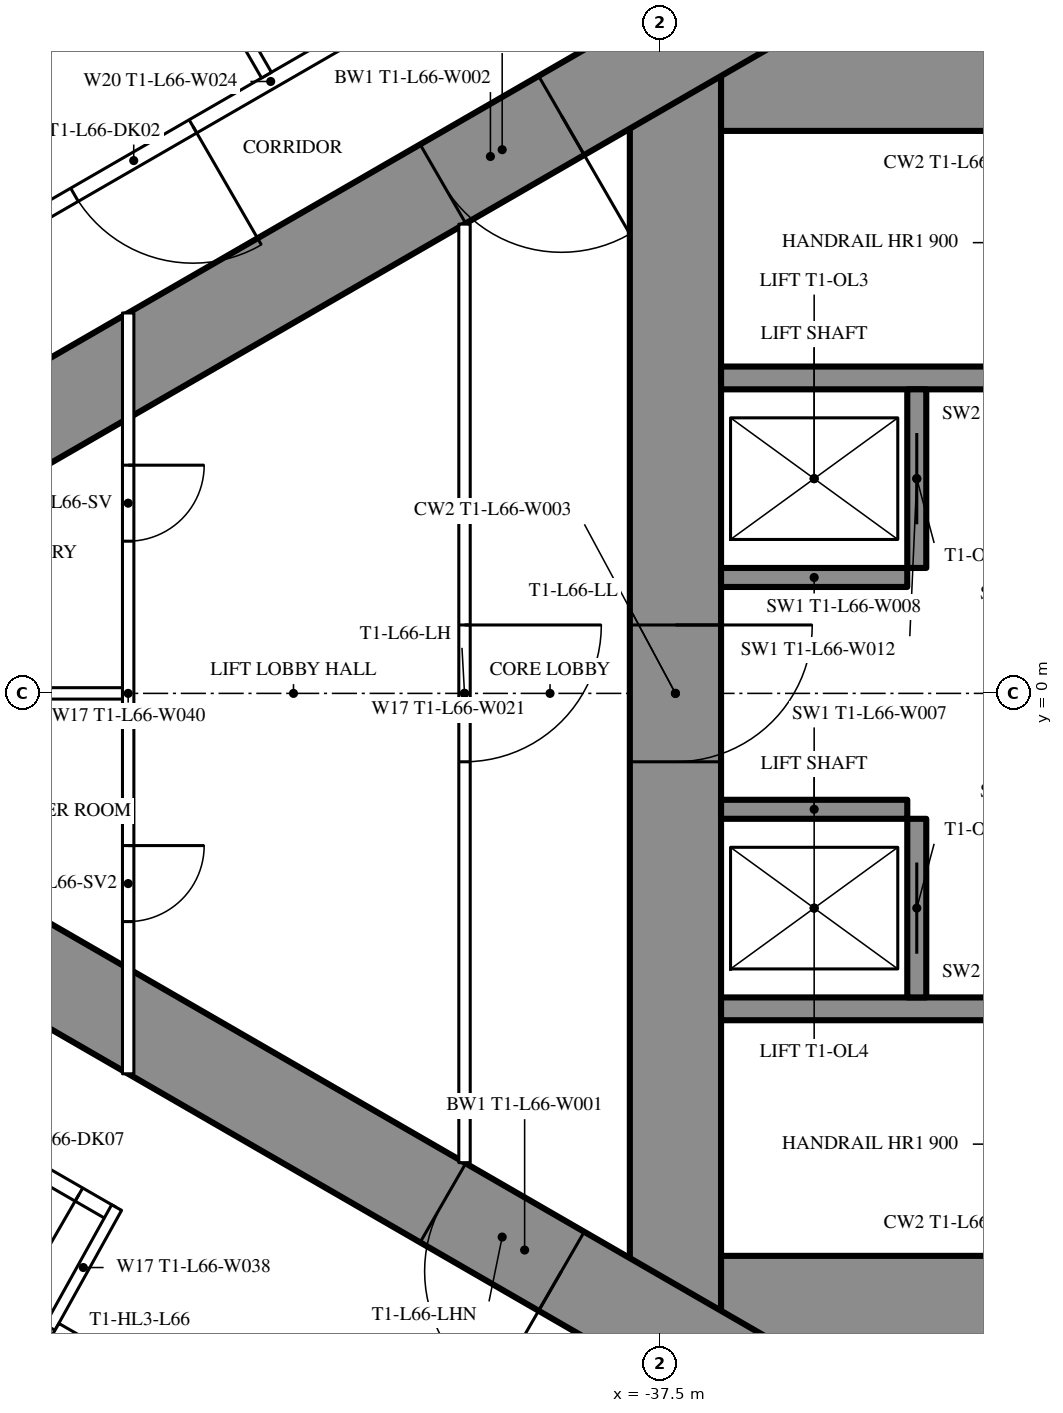
"""IFC4 building model, lengths in metres.
Left out: names, types, materials, properties, quantities, classifications, styles, units other than length and angle.
Written with IfcOpenShell. Run it as: python <this file> out.ifc"""

import sys

from ifc_helpers import new_model, si_unit, direction, frame, frame_2d, origin, place, context, subcontext, project, spatial, rectangle, extrude, element, fill, save


model = new_model("IFC4")
c1 = context("Model", 3, precision=1e-05, world=origin(), true_north=direction((0.0, 1.0)))
c2 = subcontext(c1, "Body", "Model", "MODEL_VIEW")
j1 = project(units=[si_unit("LENGTHUNIT", "METRE"), si_unit("PLANEANGLEUNIT", "RADIAN")], contexts=[c1])
p1 = place(None, origin())
s1 = spatial("IfcSite", under=j1, at=p1, CompositionType="ELEMENT")
p2 = place(p1, origin())
s2 = spatial("IfcBuilding", under=s1, at=p2, CompositionType="ELEMENT")
p3 = place(p2, frame((0.0, 0.0, 247.7)))
s3 = spatial("IfcBuildingStorey", under=s2, at=p3, CompositionType="ELEMENT", Elevation=247.7)
p4 = place(p3, frame((-37.3, 8.6, 0.0), z_axis=(0.0, 0.0, 1.0), x_axis=(0.0, -1.0, 0.0)))
e1 = element("IfcWall", 1, at=p4, inside=s3, PredefinedType="SHEAR", context=c2, shape_type="SweptSolid", body=[
    extrude(rectangle(XDim=17.2, YDim=1.2, at=frame_2d((8.6, 0.0))), origin(), (0.0, 0.0, 1.0), 4.2),
])
p5 = place(p4, frame((7.7, 0.0, 0.0)))
e2 = element("IfcOpeningElement", 2, at=p5, cuts=e1, PredefinedType="OPENING", context=c2, shape_type="SweptSolid", body=[
    extrude(rectangle(XDim=1.8, YDim=2.2, at=frame_2d((0.9, 1.1))), frame((0.0, 0.61, 0.0), z_axis=(0.0, -1.0, 0.0), x_axis=(1.0, 0.0, 0.0)), (0.0, 0.0, 1.0), 1.22),
])
p6 = place(p3, frame((-28.3, 8.0, 0.0), z_axis=(0.0, 0.0, 1.0), x_axis=(-1.0, 0.0, 0.0)))
e3 = element("IfcWall", 3, at=p6, inside=s3, PredefinedType="SHEAR", context=c2, shape_type="SweptSolid", body=[
    extrude(rectangle(XDim=8.4, YDim=1.2, at=frame_2d((4.2, 0.0))), origin(), (0.0, 0.0, 1.0), 4.2),
])
p7 = place(p6, frame((0.25, 0.0, 0.0)))
e4 = element("IfcOpeningElement", 4, at=p7, cuts=e3, PredefinedType="OPENING", context=c2, shape_type="SweptSolid", body=[
    extrude(rectangle(XDim=1.0, YDim=2.2, at=frame_2d((0.5, 1.1))), frame((0.0, 0.61, 0.0), z_axis=(0.0, -1.0, 0.0), x_axis=(1.0, 0.0, 0.0)), (0.0, 0.0, 1.0), 1.22),
])
p8 = place(p3, frame((-28.3, -8.0, 0.0), z_axis=(0.0, 0.0, 1.0), x_axis=(-1.0, 0.0, 0.0)))
e5 = element("IfcWall", 5, at=p8, inside=s3, PredefinedType="SHEAR", context=c2, shape_type="SweptSolid", body=[
    extrude(rectangle(XDim=8.4, YDim=1.2, at=frame_2d((4.2, 0.0))), origin(), (0.0, 0.0, 1.0), 4.2),
])
p9 = place(p8, frame((0.25, 0.0, 0.0)))
e6 = element("IfcOpeningElement", 6, at=p9, cuts=e5, PredefinedType="OPENING", context=c2, shape_type="SweptSolid", body=[
    extrude(rectangle(XDim=1.0, YDim=2.2, at=frame_2d((0.5, 1.1))), frame((0.0, 0.61, 0.0), z_axis=(0.0, -1.0, 0.0), x_axis=(1.0, 0.0, 0.0)), (0.0, 0.0, 1.0), 1.22),
])
for number, where, z_axis, x_axis in (
    (7, (-28.3, 4.15, 0.0), (0.0, 0.0, 1.0), (-1.0, 0.0, 0.0)),
    (8, (-28.3, -4.15, 0.0), (0.0, 0.0, 1.0), (-1.0, 0.0, 0.0)),
):
    element("IfcWall", number, at=place(p3, frame(where, z_axis=z_axis, x_axis=x_axis)), inside=s3, PredefinedType="SHEAR", context=c2, shape_type="SweptSolid", body=[
        extrude(rectangle(XDim=8.4, YDim=0.3, at=frame_2d((4.2, 0.0))), origin(), (0.0, 0.0, 1.0), 4.2),
    ])
p10 = place(p3, frame((-34.125, 4.0, 0.0), z_axis=(0.0, 0.0, 1.0), x_axis=(0.0, -1.0, 0.0)))
e9 = element("IfcWall", 9, at=p10, inside=s3, PredefinedType="SHEAR", context=c2, shape_type="SweptSolid", body=[
    extrude(rectangle(XDim=2.35, YDim=0.25, at=frame_2d((1.175, 0.0))), origin(), (0.0, 0.0, 1.0), 4.2),
])
p11 = place(p10, frame((0.575, 0.0, 0.0)))
e10 = element("IfcOpeningElement", 10, at=p11, cuts=e9, PredefinedType="OPENING", context=c2, shape_type="SweptSolid", body=[
    extrude(rectangle(XDim=1.2, YDim=2.2, at=frame_2d((0.6, 1.1))), frame((0.0, 0.135, 0.0), z_axis=(0.0, -1.0, 0.0), x_axis=(1.0, 0.0, 0.0)), (0.0, 0.0, 1.0), 0.27),
])
p12 = place(p3, frame((-34.25, 1.525, 0.0), z_axis=(0.0, 0.0, 1.0), x_axis=(-1.0, 0.0, 0.0)))
e11 = element("IfcWall", 11, at=p12, inside=s3, PredefinedType="SHEAR", context=c2, shape_type="SweptSolid", body=[
    extrude(rectangle(XDim=2.45, YDim=0.25, at=frame_2d((1.225, 0.0))), origin(), (0.0, 0.0, 1.0), 4.2),
])
p13 = place(p3, frame((-34.125, -1.65, 0.0), z_axis=(0.0, 0.0, 1.0), x_axis=(0.0, -1.0, 0.0)))
e12 = element("IfcWall", 12, at=p13, inside=s3, PredefinedType="SHEAR", context=c2, shape_type="SweptSolid", body=[
    extrude(rectangle(XDim=2.35, YDim=0.25, at=frame_2d((1.175, 0.0))), origin(), (0.0, 0.0, 1.0), 4.2),
])
p14 = place(p13, frame((0.575, 0.0, 0.0)))
e13 = element("IfcOpeningElement", 13, at=p14, cuts=e12, PredefinedType="OPENING", context=c2, shape_type="SweptSolid", body=[
    extrude(rectangle(XDim=1.2, YDim=2.2, at=frame_2d((0.6, 1.1))), frame((0.0, 0.135, 0.0), z_axis=(0.0, -1.0, 0.0), x_axis=(1.0, 0.0, 0.0)), (0.0, 0.0, 1.0), 0.27),
])
p15 = place(p3, frame((-34.25, -1.525, 0.0), z_axis=(0.0, 0.0, 1.0), x_axis=(-1.0, 0.0, 0.0)))
e14 = element("IfcWall", 14, at=p15, inside=s3, PredefinedType="SHEAR", context=c2, shape_type="SweptSolid", body=[
    extrude(rectangle(XDim=2.45, YDim=0.25, at=frame_2d((1.225, 0.0))), origin(), (0.0, 0.0, 1.0), 4.2),
])
p16 = place(p3, frame((-27.2, 14.3, 0.0), z_axis=(0.0, 0.0, 1.0), x_axis=(-0.866026593062, -0.499997940104, 0.0)))
e15 = element("IfcWall", 15, at=p16, inside=s3, PredefinedType="SHEAR", context=c2, shape_type="SweptSolid", body=[
    extrude(rectangle(XDim=28.946, YDim=1.2, at=frame_2d((14.473, 0.0))), origin(), (0.0, 0.0, 1.0), 4.2),
])
p17 = place(p16, frame((4.6, 0.0, 0.0)))
e16 = element("IfcOpeningElement", 16, at=p17, cuts=e15, PredefinedType="OPENING", context=c2, shape_type="SweptSolid", body=[
    extrude(rectangle(XDim=1.0, YDim=2.2, at=frame_2d((0.5, 1.1))), frame((0.0, 0.61, 0.0), z_axis=(0.0, -1.0, 0.0), x_axis=(1.0, 0.0, 0.0)), (0.0, 0.0, 1.0), 1.22),
])
p18 = place(p16, frame((13.395, 0.0, 0.0)))
e17 = element("IfcOpeningElement", 17, at=p18, cuts=e15, PredefinedType="OPENING", context=c2, shape_type="SweptSolid", body=[
    extrude(rectangle(XDim=1.8, YDim=2.2, at=frame_2d((0.9, 1.1))), frame((0.0, 0.61, 0.0), z_axis=(0.0, -1.0, 0.0), x_axis=(1.0, 0.0, 0.0)), (0.0, 0.0, 1.0), 1.22),
])
p19 = place(p3, frame((-27.2, -14.3, 0.0), z_axis=(0.0, 0.0, 1.0), x_axis=(-0.866024021859, 0.500002393557, 0.0)))
e18 = element("IfcWall", 18, at=p19, inside=s3, PredefinedType="SHEAR", context=c2, shape_type="SweptSolid", body=[
    extrude(rectangle(XDim=27.907, YDim=1.2, at=frame_2d((13.954, 0.0))), origin(), (0.0, 0.0, 1.0), 4.2),
])
p20 = place(p19, frame((4.6, 0.0, 0.0)))
e19 = element("IfcOpeningElement", 19, at=p20, cuts=e18, PredefinedType="OPENING", context=c2, shape_type="SweptSolid", body=[
    extrude(rectangle(XDim=1.0, YDim=2.2, at=frame_2d((0.5, 1.1))), frame((0.0, 0.61, 0.0), z_axis=(0.0, -1.0, 0.0), x_axis=(1.0, 0.0, 0.0)), (0.0, 0.0, 1.0), 1.22),
])
p21 = place(p19, frame((13.395, 0.0, 0.0)))
e20 = element("IfcOpeningElement", 20, at=p21, cuts=e18, PredefinedType="OPENING", context=c2, shape_type="SweptSolid", body=[
    extrude(rectangle(XDim=1.8, YDim=2.2, at=frame_2d((0.9, 1.1))), frame((0.0, 0.61, 0.0), z_axis=(0.0, -1.0, 0.0), x_axis=(1.0, 0.0, 0.0)), (0.0, 0.0, 1.0), 1.22),
])
p22 = place(p3, frame((-28.681, 16.101, 0.0), z_axis=(0.0, 0.0, 1.0), x_axis=(-0.866024860443, -0.500000941094, 0.0)))
e21 = element("IfcWall", 21, at=p22, inside=s3, PredefinedType="PARTITIONING", context=c2, shape_type="SweptSolid", body=[
    extrude(rectangle(XDim=32.201, YDim=0.2, at=frame_2d((16.101, 0.0))), origin(), (0.0, 0.0, 1.0), 3.95),
])
p23 = place(p22, frame((7.266, 0.0, 0.0)))
e22 = element("IfcOpeningElement", 22, at=p23, cuts=e21, PredefinedType="OPENING", context=c2, shape_type="SweptSolid", body=[
    extrude(rectangle(XDim=1.8, YDim=2.2, at=frame_2d((0.9, 1.1))), frame((0.0, 0.11, 0.0), z_axis=(0.0, -1.0, 0.0), x_axis=(1.0, 0.0, 0.0)), (0.0, 0.0, 1.0), 0.22),
])
p24 = place(p22, frame((17.281, 0.0, 0.0)))
e23 = element("IfcOpeningElement", 23, at=p24, cuts=e21, PredefinedType="OPENING", context=c2, shape_type="SweptSolid", body=[
    extrude(rectangle(XDim=1.8, YDim=2.2, at=frame_2d((0.9, 1.1))), frame((0.0, 0.11, 0.0), z_axis=(0.0, -1.0, 0.0), x_axis=(1.0, 0.0, 0.0)), (0.0, 0.0, 1.0), 0.22),
])
p25 = place(p22, frame((21.43, 0.0, 0.0)))
e24 = element("IfcOpeningElement", 24, at=p25, cuts=e21, PredefinedType="OPENING", context=c2, shape_type="SweptSolid", body=[
    extrude(rectangle(XDim=1.8, YDim=2.2, at=frame_2d((0.9, 1.1))), frame((0.0, 0.11, 0.0), z_axis=(0.0, -1.0, 0.0), x_axis=(1.0, 0.0, 0.0)), (0.0, 0.0, 1.0), 0.22),
])
p26 = place(p22, frame((27.29, 0.0, 0.0)))
e25 = element("IfcOpeningElement", 25, at=p26, cuts=e21, PredefinedType="OPENING", context=c2, shape_type="SweptSolid", body=[
    extrude(rectangle(XDim=1.8, YDim=2.2, at=frame_2d((0.9, 1.1))), frame((0.0, 0.11, 0.0), z_axis=(0.0, -1.0, 0.0), x_axis=(1.0, 0.0, 0.0)), (0.0, 0.0, 1.0), 0.22),
])
p27 = place(p3, frame((-42.68, 8.134, 0.0), z_axis=(0.0, 0.0, 1.0), x_axis=(-0.499984479505, 0.866034364361, 0.0)))
e26 = element("IfcWall", 26, at=p27, inside=s3, PredefinedType="PARTITIONING", context=c2, shape_type="SweptSolid", body=[
    extrude(rectangle(XDim=5.995, YDim=0.15, at=frame_2d((2.998, 0.0))), origin(), (0.0, 0.0, 1.0), 3.05),
])
p28 = place(p3, frame((-44.715, -6.844, 0.0), z_axis=(0.0, 0.0, 1.0), x_axis=(-0.866025261224, 0.500000246922, 0.0)))
e27 = element("IfcWall", 27, at=p28, inside=s3, PredefinedType="PARTITIONING", context=c2, shape_type="SweptSolid", body=[
    extrude(rectangle(XDim=13.567, YDim=0.2, at=frame_2d((6.783, 0.0))), origin(), (0.0, 0.0, 1.0), 3.95),
])
p29 = place(p28, frame((8.716, 0.0, 0.0)))
e28 = element("IfcOpeningElement", 28, at=p29, cuts=e27, PredefinedType="OPENING", context=c2, shape_type="SweptSolid", body=[
    extrude(rectangle(XDim=1.8, YDim=2.2, at=frame_2d((0.9, 1.1))), frame((0.0, 0.11, 0.0), z_axis=(0.0, -1.0, 0.0), x_axis=(1.0, 0.0, 0.0)), (0.0, 0.0, 1.0), 0.22),
])
p30 = place(p28, frame((2.916, 0.0, 0.0)))
e29 = element("IfcOpeningElement", 29, at=p30, cuts=e27, PredefinedType="OPENING", context=c2, shape_type="SweptSolid", body=[
    extrude(rectangle(XDim=1.8, YDim=2.2, at=frame_2d((0.9, 1.1))), frame((0.0, 0.11, 0.0), z_axis=(0.0, -1.0, 0.0), x_axis=(1.0, 0.0, 0.0)), (0.0, 0.0, 1.0), 0.22),
])
p31 = place(p28, frame((0.5, 0.0, 0.0)))
e30 = element("IfcOpeningElement", 30, at=p31, cuts=e27, PredefinedType="OPENING", context=c2, shape_type="SweptSolid", body=[
    extrude(rectangle(XDim=0.967, YDim=2.2, at=frame_2d((0.483, 1.1))), frame((0.0, 0.11, 0.0), z_axis=(0.0, -1.0, 0.0), x_axis=(1.0, 0.0, 0.0)), (0.0, 0.0, 1.0), 0.22),
])
p32 = place(p3, frame((-44.652, -6.764, 0.0), z_axis=(0.0, 0.0, 1.0), x_axis=(-0.485528096672, -0.8742210632, 0.0)))
e31 = element("IfcWall", 31, at=p32, inside=s3, PredefinedType="PARTITIONING", context=c2, shape_type="SweptSolid", body=[
    extrude(rectangle(XDim=1.805, YDim=0.15, at=frame_2d((0.903, 0.0))), origin(), (0.0, 0.0, 1.0), 3.95),
])
p33 = place(p3, frame((-40.075, 6.174, 0.0), z_axis=(0.0, 0.0, 1.0), x_axis=(0.0, -1.0, 0.0)))
e32 = element("IfcWall", 32, at=p33, inside=s3, PredefinedType="PARTITIONING", context=c2, shape_type="SweptSolid", body=[
    extrude(rectangle(XDim=12.348, YDim=0.15, at=frame_2d((6.174, 0.0))), origin(), (0.0, 0.0, 1.0), 3.95),
])
p34 = place(p33, frame((5.274, 0.0, 0.0)))
e33 = element("IfcOpeningElement", 33, at=p34, cuts=e32, PredefinedType="OPENING", context=c2, shape_type="SweptSolid", body=[
    extrude(rectangle(XDim=1.8, YDim=2.2, at=frame_2d((0.9, 1.1))), frame((0.0, 0.085, 0.0), z_axis=(0.0, -1.0, 0.0), x_axis=(1.0, 0.0, 0.0)), (0.0, 0.0, 1.0), 0.17),
])
p35 = place(p3, frame((-44.5, 5.005, 0.0), z_axis=(0.0, 0.0, 1.0), x_axis=(0.0, -1.0, 0.0)))
e34 = element("IfcWall", 34, at=p35, inside=s3, PredefinedType="PARTITIONING", context=c2, shape_type="SweptSolid", body=[
    extrude(rectangle(XDim=10.009, YDim=0.15, at=frame_2d((5.005, 0.0))), origin(), (0.0, 0.0, 1.0), 3.1),
])
p36 = place(p35, frame((2.002, 0.0, 0.0)))
e35 = element("IfcOpeningElement", 35, at=p36, cuts=e34, PredefinedType="OPENING", context=c2, shape_type="SweptSolid", body=[
    extrude(rectangle(XDim=1.0, YDim=2.2, at=frame_2d((0.5, 1.1))), frame((0.0, 0.085, 0.0), z_axis=(0.0, -1.0, 0.0), x_axis=(1.0, 0.0, 0.0)), (0.0, 0.0, 1.0), 0.17),
])
p37 = place(p35, frame((7.007, 0.0, 0.0)))
e36 = element("IfcOpeningElement", 36, at=p37, cuts=e34, PredefinedType="OPENING", context=c2, shape_type="SweptSolid", body=[
    extrude(rectangle(XDim=1.0, YDim=2.2, at=frame_2d((0.5, 1.1))), frame((0.0, 0.085, 0.0), z_axis=(0.0, -1.0, 0.0), x_axis=(1.0, 0.0, 0.0)), (0.0, 0.0, 1.0), 0.17),
])
p38 = place(p3, frame((-44.575, 0.0, 0.0), z_axis=(0.0, 0.0, 1.0), x_axis=(-1.0, 0.0, 0.0)))
e37 = element("IfcWall", 37, at=p38, inside=s3, PredefinedType="PARTITIONING", context=c2, shape_type="SweptSolid", body=[
    extrude(rectangle(XDim=8.593, YDim=0.15, at=frame_2d((4.297, 0.0))), origin(), (0.0, 0.0, 1.0), 3.05),
])
p39 = place(p3, frame((-39.758, -11.697, 0.0), z_axis=(0.0, 0.0, 1.0), x_axis=(-0.866024194504, 0.500002094529, 0.0)))
e38 = element("IfcWall", 38, at=p39, inside=s3, PredefinedType="PARTITIONING", context=c2, shape_type="SweptSolid", body=[
    extrude(rectangle(XDim=6.6, YDim=0.25, at=frame_2d((3.3, 0.0))), origin(), (0.0, 0.0, 1.0), 3.95),
])
p40 = place(p39, frame((0.75, 0.0, 0.0)))
e39 = element("IfcOpeningElement", 39, at=p40, cuts=e38, PredefinedType="OPENING", context=c2, shape_type="SweptSolid", body=[
    extrude(rectangle(XDim=1.1, YDim=2.2, at=frame_2d((0.55, 1.1))), frame((0.0, 0.135, 0.0), z_axis=(0.0, -1.0, 0.0), x_axis=(1.0, 0.0, 0.0)), (0.0, 0.0, 1.0), 0.27),
])
p41 = place(p39, frame((2.75, 0.0, 0.0)))
e40 = element("IfcOpeningElement", 40, at=p41, cuts=e38, PredefinedType="OPENING", context=c2, shape_type="SweptSolid", body=[
    extrude(rectangle(XDim=1.1, YDim=2.2, at=frame_2d((0.55, 1.1))), frame((0.0, 0.135, 0.0), z_axis=(0.0, -1.0, 0.0), x_axis=(1.0, 0.0, 0.0)), (0.0, 0.0, 1.0), 0.27),
])
p42 = place(p39, frame((4.75, 0.0, 0.0)))
e41 = element("IfcOpeningElement", 41, at=p42, cuts=e38, PredefinedType="OPENING", context=c2, shape_type="SweptSolid", body=[
    extrude(rectangle(XDim=1.1, YDim=2.2, at=frame_2d((0.55, 1.1))), frame((0.0, 0.135, 0.0), z_axis=(0.0, -1.0, 0.0), x_axis=(1.0, 0.0, 0.0)), (0.0, 0.0, 1.0), 0.27),
])
p43 = place(p24, origin())
e42 = element("IfcDoor", 42, at=p43, inside=s3, OperationType="DOUBLE_DOOR_SINGLE_SWING", PredefinedType="DOOR", context=c2, shape_type="SweptSolid", body=[
    extrude(rectangle(XDim=1.8, YDim=2.2, at=frame_2d((0.9, 1.1))), frame((0.0, 0.025, 0.0), z_axis=(0.0, -1.0, 0.0), x_axis=(1.0, 0.0, 0.0)), (0.0, 0.0, 1.0), 0.05),
])
fill(e23, e42)
p44 = place(p31, origin())
e43 = element("IfcDoor", 43, at=p44, inside=s3, OperationType="SINGLE_SWING_LEFT", PredefinedType="DOOR", context=c2, shape_type="SweptSolid", body=[
    extrude(rectangle(XDim=0.967, YDim=2.2, at=frame_2d((0.483, 1.1))), frame((0.0, 0.025, 0.0), z_axis=(0.0, -1.0, 0.0), x_axis=(1.0, 0.0, 0.0)), (0.0, 0.0, 1.0), 0.05),
])
fill(e30, e43)
p45 = place(p34, origin())
e44 = element("IfcDoor", 44, at=p45, inside=s3, OperationType="DOUBLE_DOOR_SINGLE_SWING", PredefinedType="DOOR", context=c2, shape_type="SweptSolid", body=[
    extrude(rectangle(XDim=1.8, YDim=2.2, at=frame_2d((0.9, 1.1))), frame((0.0, 0.025, 0.0), z_axis=(0.0, -1.0, 0.0), x_axis=(1.0, 0.0, 0.0)), (0.0, 0.0, 1.0), 0.05),
])
fill(e33, e44)
p46 = place(p36, origin())
e45 = element("IfcDoor", 45, at=p46, inside=s3, OperationType="SINGLE_SWING_LEFT", PredefinedType="DOOR", context=c2, shape_type="SweptSolid", body=[
    extrude(rectangle(XDim=1.0, YDim=2.2, at=frame_2d((0.5, 1.1))), frame((0.0, 0.025, 0.0), z_axis=(0.0, -1.0, 0.0), x_axis=(1.0, 0.0, 0.0)), (0.0, 0.0, 1.0), 0.05),
])
fill(e35, e45)
p47 = place(p37, origin())
e46 = element("IfcDoor", 46, at=p47, inside=s3, OperationType="SINGLE_SWING_LEFT", PredefinedType="DOOR", context=c2, shape_type="SweptSolid", body=[
    extrude(rectangle(XDim=1.0, YDim=2.2, at=frame_2d((0.5, 1.1))), frame((0.0, 0.025, 0.0), z_axis=(0.0, -1.0, 0.0), x_axis=(1.0, 0.0, 0.0)), (0.0, 0.0, 1.0), 0.05),
])
fill(e36, e46)
p48 = place(p18, origin())
e47 = element("IfcDoor", 47, at=p48, inside=s3, OperationType="DOUBLE_DOOR_SINGLE_SWING", PredefinedType="DOOR", context=c2, shape_type="SweptSolid", body=[
    extrude(rectangle(XDim=1.8, YDim=2.2, at=frame_2d((0.9, 1.1))), frame((0.0, 0.025, 0.0), z_axis=(0.0, -1.0, 0.0), x_axis=(1.0, 0.0, 0.0)), (0.0, 0.0, 1.0), 0.05),
])
fill(e17, e47)
p49 = place(p21, origin())
e48 = element("IfcDoor", 48, at=p49, inside=s3, OperationType="DOUBLE_DOOR_SINGLE_SWING", PredefinedType="DOOR", context=c2, shape_type="SweptSolid", body=[
    extrude(rectangle(XDim=1.8, YDim=2.2, at=frame_2d((0.9, 1.1))), frame((0.0, 0.025, 0.0), z_axis=(0.0, -1.0, 0.0), x_axis=(1.0, 0.0, 0.0)), (0.0, 0.0, 1.0), 0.05),
])
fill(e20, e48)
p50 = place(p5, origin())
e49 = element("IfcDoor", 49, at=p50, inside=s3, OperationType="DOUBLE_DOOR_SINGLE_SWING", PredefinedType="DOOR", context=c2, shape_type="SweptSolid", body=[
    extrude(rectangle(XDim=1.8, YDim=2.2, at=frame_2d((0.9, 1.1))), frame((0.0, 0.025, 0.0), z_axis=(0.0, -1.0, 0.0), x_axis=(1.0, 0.0, 0.0)), (0.0, 0.0, 1.0), 0.05),
])
fill(e2, e49)
p51 = place(p11, origin())
e50 = element("IfcDoor", 50, at=p51, inside=s3, OperationType="DOUBLE_DOOR_SLIDING", PredefinedType="USERDEFINED", context=c2, shape_type="SweptSolid", body=[
    extrude(rectangle(XDim=1.2, YDim=2.2, at=frame_2d((0.6, 1.1))), frame((0.0, 0.025, 0.0), z_axis=(0.0, -1.0, 0.0), x_axis=(1.0, 0.0, 0.0)), (0.0, 0.0, 1.0), 0.05),
])
fill(e10, e50)
p52 = place(p14, origin())
e51 = element("IfcDoor", 51, at=p52, inside=s3, OperationType="DOUBLE_DOOR_SLIDING", PredefinedType="USERDEFINED", context=c2, shape_type="SweptSolid", body=[
    extrude(rectangle(XDim=1.2, YDim=2.2, at=frame_2d((0.6, 1.1))), frame((0.0, 0.025, 0.0), z_axis=(0.0, -1.0, 0.0), x_axis=(1.0, 0.0, 0.0)), (0.0, 0.0, 1.0), 0.05),
])
fill(e13, e51)
save(model, sys.argv[1])
